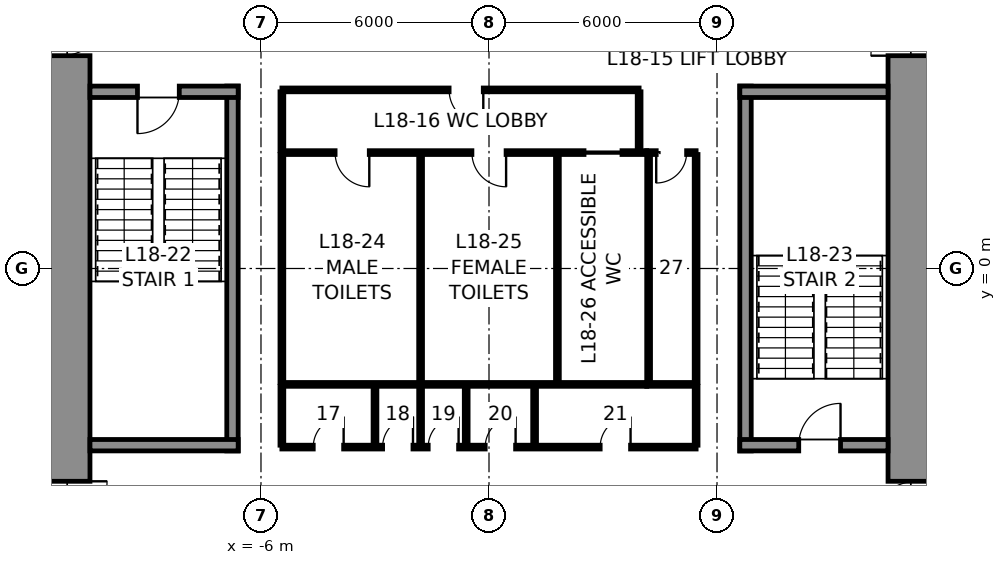
"""IFC4 building model, lengths in metres.
Left out: names, types, materials, properties, quantities, classifications, styles, units other than length and angle.
Written with IfcOpenShell. Run it as: python <this file> out.ifc"""

import sys

from ifc_helpers import new_model, si_unit, direction, frame, frame_2d, origin, place, context, subcontext, project, spatial, rectangle, extrude, element, fill, save


model = new_model("IFC4")
c1 = context("Model", 3, precision=1e-05, world=origin(), true_north=direction((0.0, 1.0)))
c2 = subcontext(c1, "Body", "Model", "MODEL_VIEW")
j1 = project(units=[si_unit("LENGTHUNIT", "METRE"), si_unit("PLANEANGLEUNIT", "RADIAN")], contexts=[c1])
p1 = place(None, origin())
s1 = spatial("IfcSite", under=j1, at=p1, CompositionType="ELEMENT")
p2 = place(p1, origin())
s2 = spatial("IfcBuilding", under=s1, at=p2, CompositionType="ELEMENT")
p3 = place(p2, frame((0.0, 0.0, 95.2)))
s3 = spatial("IfcBuildingStorey", under=s2, at=p3, CompositionType="ELEMENT", Elevation=95.2)
p4 = place(p3, frame((11.25, 10.5, 0.0), z_axis=(0.0, 0.0, 1.0), x_axis=(0.0, -1.0, 0.0)))
e1 = element("IfcWall", 1, at=p4, inside=s3, PredefinedType="SHEAR", context=c2, shape_type="SweptSolid", body=[
    extrude(rectangle(XDim=21.0, YDim=1.5, at=frame_2d((10.5, 0.0))), origin(), (0.0, 0.0, 1.0), 4.6),
])
p5 = place(p4, frame((3.7, 0.0, 0.0)))
e2 = element("IfcOpeningElement", 2, at=p5, cuts=e1, PredefinedType="OPENING", context=c2, shape_type="SweptSolid", body=[
    extrude(rectangle(XDim=1.2, YDim=2.3, at=frame_2d((0.6, 1.15))), frame((0.0, 0.76, 0.0), z_axis=(0.0, -1.0, 0.0), x_axis=(1.0, 0.0, 0.0)), (0.0, 0.0, 1.0), 1.52),
])
p6 = place(p4, frame((16.1, 0.0, 0.0)))
e3 = element("IfcOpeningElement", 3, at=p6, cuts=e1, PredefinedType="OPENING", context=c2, shape_type="SweptSolid", body=[
    extrude(rectangle(XDim=1.2, YDim=2.3, at=frame_2d((0.6, 1.15))), frame((0.0, 0.76, 0.0), z_axis=(0.0, -1.0, 0.0), x_axis=(1.0, 0.0, 0.0)), (0.0, 0.0, 1.0), 1.52),
])
p7 = place(p3, frame((-11.25, -10.5, 0.0), z_axis=(0.0, 0.0, 1.0), x_axis=(0.0, 1.0, 0.0)))
e4 = element("IfcWall", 4, at=p7, inside=s3, PredefinedType="SHEAR", context=c2, shape_type="SweptSolid", body=[
    extrude(rectangle(XDim=21.0, YDim=1.5, at=frame_2d((10.5, 0.0))), origin(), (0.0, 0.0, 1.0), 4.6),
])
p8 = place(p7, frame((16.1, 0.0, 0.0)))
e5 = element("IfcOpeningElement", 5, at=p8, cuts=e4, PredefinedType="OPENING", context=c2, shape_type="SweptSolid", body=[
    extrude(rectangle(XDim=1.2, YDim=2.3, at=frame_2d((0.6, 1.15))), frame((0.0, 0.76, 0.0), z_axis=(0.0, -1.0, 0.0), x_axis=(1.0, 0.0, 0.0)), (0.0, 0.0, 1.0), 1.52),
])
p9 = place(p7, frame((3.7, 0.0, 0.0)))
e6 = element("IfcOpeningElement", 6, at=p9, cuts=e4, PredefinedType="OPENING", context=c2, shape_type="SweptSolid", body=[
    extrude(rectangle(XDim=1.2, YDim=2.3, at=frame_2d((0.6, 1.15))), frame((0.0, 0.76, 0.0), z_axis=(0.0, -1.0, 0.0), x_axis=(1.0, 0.0, 0.0)), (0.0, 0.0, 1.0), 1.52),
])
p10 = place(p3, frame((-6.75, -4.8, 0.0), z_axis=(0.0, 0.0, 1.0), x_axis=(0.0, 1.0, 0.0)))
e7 = element("IfcWall", 7, at=p10, inside=s3, PredefinedType="SOLIDWALL", context=c2, shape_type="SweptSolid", body=[
    extrude(rectangle(XDim=9.6, YDim=0.3, at=frame_2d((4.8, 0.0))), origin(), (0.0, 0.0, 1.0), 4.35),
])
p11 = place(p3, frame((-10.5, 4.65, 0.0), z_axis=(0.0, 0.0, 1.0), x_axis=(1.0, 0.0, 0.0)))
e8 = element("IfcWall", 8, at=p11, inside=s3, PredefinedType="SOLIDWALL", context=c2, shape_type="SweptSolid", body=[
    extrude(rectangle(XDim=3.9, YDim=0.3, at=frame_2d((1.95, 0.0))), origin(), (0.0, 0.0, 1.0), 4.35),
])
p12 = place(p11, frame((1.25, 0.0, 0.0)))
e9 = element("IfcOpeningElement", 9, at=p12, cuts=e8, PredefinedType="OPENING", context=c2, shape_type="SweptSolid", body=[
    extrude(rectangle(XDim=1.1, YDim=2.3, at=frame_2d((0.55, 1.15))), frame((0.0, 0.16, 0.0), z_axis=(0.0, -1.0, 0.0), x_axis=(1.0, 0.0, 0.0)), (0.0, 0.0, 1.0), 0.32),
])
p13 = place(p3, frame((-6.6, -4.65, 0.0), z_axis=(0.0, 0.0, 1.0), x_axis=(-1.0, 0.0, 0.0)))
e10 = element("IfcWall", 10, at=p13, inside=s3, PredefinedType="SOLIDWALL", context=c2, shape_type="SweptSolid", body=[
    extrude(rectangle(XDim=3.9, YDim=0.3, at=frame_2d((1.95, 0.0))), origin(), (0.0, 0.0, 1.0), 4.35),
])
p14 = place(p3, frame((6.75, -4.8, 0.0), z_axis=(0.0, 0.0, 1.0), x_axis=(0.0, 1.0, 0.0)))
e11 = element("IfcWall", 11, at=p14, inside=s3, PredefinedType="SOLIDWALL", context=c2, shape_type="SweptSolid", body=[
    extrude(rectangle(XDim=9.6, YDim=0.3, at=frame_2d((4.8, 0.0))), origin(), (0.0, 0.0, 1.0), 4.35),
])
p15 = place(p3, frame((6.6, 4.65, 0.0), z_axis=(0.0, 0.0, 1.0), x_axis=(1.0, 0.0, 0.0)))
e12 = element("IfcWall", 12, at=p15, inside=s3, PredefinedType="SOLIDWALL", context=c2, shape_type="SweptSolid", body=[
    extrude(rectangle(XDim=3.9, YDim=0.3, at=frame_2d((1.95, 0.0))), origin(), (0.0, 0.0, 1.0), 4.35),
])
p16 = place(p3, frame((10.5, -4.65, 0.0), z_axis=(0.0, 0.0, 1.0), x_axis=(-1.0, 0.0, 0.0)))
e13 = element("IfcWall", 13, at=p16, inside=s3, PredefinedType="SOLIDWALL", context=c2, shape_type="SweptSolid", body=[
    extrude(rectangle(XDim=3.9, YDim=0.3, at=frame_2d((1.95, 0.0))), origin(), (0.0, 0.0, 1.0), 4.35),
])
p17 = place(p16, frame((1.25, 0.0, 0.0)))
e14 = element("IfcOpeningElement", 14, at=p17, cuts=e13, PredefinedType="OPENING", context=c2, shape_type="SweptSolid", body=[
    extrude(rectangle(XDim=1.1, YDim=2.3, at=frame_2d((0.55, 1.15))), frame((0.0, 0.16, 0.0), z_axis=(0.0, -1.0, 0.0), x_axis=(1.0, 0.0, 0.0)), (0.0, 0.0, 1.0), 0.32),
])
p18 = place(p3, frame((-5.45, 3.05, 0.0), z_axis=(0.0, 0.0, 1.0), x_axis=(1.0, 0.0, 0.0)))
e15 = element("IfcWall", 15, at=p18, inside=s3, PredefinedType="PARTITIONING", context=c2, shape_type="SweptSolid", body=[
    extrude(rectangle(XDim=9.6, YDim=0.1, at=frame_2d((4.8, 0.0))), origin(), (0.0, 0.0, 1.0), 4.35),
])
p19 = place(p18, frame((1.4, 0.0, 0.0)))
e16 = element("IfcOpeningElement", 16, at=p19, cuts=e15, PredefinedType="OPENING", context=c2, shape_type="SweptSolid", body=[
    extrude(rectangle(XDim=0.9, YDim=2.3, at=frame_2d((0.45, 1.15))), frame((0.0, 0.06, 0.0), z_axis=(0.0, -1.0, 0.0), x_axis=(1.0, 0.0, 0.0)), (0.0, 0.0, 1.0), 0.12),
])
p20 = place(p18, frame((5.0, 0.0, 0.0)))
e17 = element("IfcOpeningElement", 17, at=p20, cuts=e15, PredefinedType="OPENING", context=c2, shape_type="SweptSolid", body=[
    extrude(rectangle(XDim=0.9, YDim=2.3, at=frame_2d((0.45, 1.15))), frame((0.0, 0.06, 0.0), z_axis=(0.0, -1.0, 0.0), x_axis=(1.0, 0.0, 0.0)), (0.0, 0.0, 1.0), 0.12),
])
p21 = place(p18, frame((7.95, 0.0, 0.0)))
e18 = element("IfcOpeningElement", 18, at=p21, cuts=e15, PredefinedType="OPENING", context=c2, shape_type="SweptSolid", body=[
    extrude(rectangle(XDim=1.0, YDim=2.3, at=frame_2d((0.5, 1.15))), frame((0.0, 0.06, 0.0), z_axis=(0.0, -1.0, 0.0), x_axis=(1.0, 0.0, 0.0)), (0.0, 0.0, 1.0), 0.12),
])
p22 = place(p3, frame((4.15, 3.05, 0.0), z_axis=(0.0, 0.0, 1.0), x_axis=(1.0, 0.0, 0.0)))
e19 = element("IfcWall", 19, at=p22, inside=s3, PredefinedType="PARTITIONING", context=c2, shape_type="SweptSolid", body=[
    extrude(rectangle(XDim=1.3, YDim=0.1, at=frame_2d((0.65, 0.0))), origin(), (0.0, 0.0, 1.0), 4.35),
])
p23 = place(p22, frame((0.25, 0.0, 0.0)))
e20 = element("IfcOpeningElement", 20, at=p23, cuts=e19, PredefinedType="OPENING", context=c2, shape_type="SweptSolid", body=[
    extrude(rectangle(XDim=0.8, YDim=2.3, at=frame_2d((0.4, 1.15))), frame((0.0, 0.06, 0.0), z_axis=(0.0, -1.0, 0.0), x_axis=(1.0, 0.0, 0.0)), (0.0, 0.0, 1.0), 0.12),
])
p24 = place(p3, frame((4.15, -3.05, 0.0), z_axis=(0.0, 0.0, 1.0), x_axis=(-1.0, 0.0, 0.0)))
e21 = element("IfcWall", 21, at=p24, inside=s3, PredefinedType="PARTITIONING", context=c2, shape_type="SweptSolid", body=[
    extrude(rectangle(XDim=9.6, YDim=0.1, at=frame_2d((4.8, 0.0))), origin(), (0.0, 0.0, 1.0), 4.35),
])
p25 = place(p3, frame((5.45, -3.05, 0.0), z_axis=(0.0, 0.0, 1.0), x_axis=(-1.0, 0.0, 0.0)))
e22 = element("IfcWall", 22, at=p25, inside=s3, PredefinedType="PARTITIONING", context=c2, shape_type="SweptSolid", body=[
    extrude(rectangle(XDim=1.3, YDim=0.1, at=frame_2d((0.65, 0.0))), origin(), (0.0, 0.0, 1.0), 4.35),
])
for number, where, z_axis, x_axis in (
    (23, (5.45, 3.0, 0.0), (0.0, 0.0, 1.0), (0.0, -1.0, 0.0)),
    (24, (-5.45, -3.0, 0.0), (0.0, 0.0, 1.0), (0.0, 1.0, 0.0)),
    (25, (-1.8, -3.0, 0.0), (0.0, 0.0, 1.0), (0.0, 1.0, 0.0)),
    (26, (1.8, -3.0, 0.0), (0.0, 0.0, 1.0), (0.0, 1.0, 0.0)),
    (27, (4.2, -3.0, 0.0), (0.0, 0.0, 1.0), (0.0, 1.0, 0.0)),
):
    element("IfcWall", number, at=place(p3, frame(where, z_axis=z_axis, x_axis=x_axis)), inside=s3, PredefinedType="PARTITIONING", context=c2, shape_type="SweptSolid", body=[
        extrude(rectangle(XDim=6.0, YDim=0.1, at=frame_2d((3.0, 0.0))), origin(), (0.0, 0.0, 1.0), 4.35),
    ])
p26 = place(p3, frame((-5.45, 4.7, 0.0), z_axis=(0.0, 0.0, 1.0), x_axis=(1.0, 0.0, 0.0)))
e28 = element("IfcWall", 28, at=p26, inside=s3, PredefinedType="PARTITIONING", context=c2, shape_type="SweptSolid", body=[
    extrude(rectangle(XDim=9.4, YDim=0.1, at=frame_2d((4.7, 0.0))), origin(), (0.0, 0.0, 1.0), 4.35),
])
p27 = place(p26, frame((4.4, 0.0, 0.0)))
e29 = element("IfcOpeningElement", 29, at=p27, cuts=e28, PredefinedType="OPENING", context=c2, shape_type="SweptSolid", body=[
    extrude(rectangle(XDim=0.9, YDim=2.3, at=frame_2d((0.45, 1.15))), frame((0.0, 0.06, 0.0), z_axis=(0.0, -1.0, 0.0), x_axis=(1.0, 0.0, 0.0)), (0.0, 0.0, 1.0), 0.12),
])
for number, where, z_axis, x_axis in (
    (30, (-5.45, 3.1, 0.0), (0.0, 0.0, 1.0), (0.0, 1.0, 0.0)),
    (31, (3.95, 3.1, 0.0), (0.0, 0.0, 1.0), (0.0, 1.0, 0.0)),
):
    element("IfcWall", number, at=place(p3, frame(where, z_axis=z_axis, x_axis=x_axis)), inside=s3, PredefinedType="PARTITIONING", context=c2, shape_type="SweptSolid", body=[
        extrude(rectangle(XDim=1.55, YDim=0.1, at=frame_2d((0.775, 0.0))), origin(), (0.0, 0.0, 1.0), 4.35),
    ])
p28 = place(p3, frame((5.45, -4.7, 0.0), z_axis=(0.0, 0.0, 1.0), x_axis=(-1.0, 0.0, 0.0)))
e32 = element("IfcWall", 32, at=p28, inside=s3, PredefinedType="PARTITIONING", context=c2, shape_type="SweptSolid", body=[
    extrude(rectangle(XDim=10.9, YDim=0.1, at=frame_2d((5.45, 0.0))), origin(), (0.0, 0.0, 1.0), 4.35),
])
p29 = place(p28, frame((9.275, 0.0, 0.0)))
e33 = element("IfcOpeningElement", 33, at=p29, cuts=e32, PredefinedType="OPENING", context=c2, shape_type="SweptSolid", body=[
    extrude(rectangle(XDim=0.8, YDim=2.3, at=frame_2d((0.4, 1.15))), frame((0.0, 0.06, 0.0), z_axis=(0.0, -1.0, 0.0), x_axis=(1.0, 0.0, 0.0)), (0.0, 0.0, 1.0), 0.12),
])
p30 = place(p28, frame((7.45, 0.0, 0.0)))
e34 = element("IfcOpeningElement", 34, at=p30, cuts=e32, PredefinedType="OPENING", context=c2, shape_type="SweptSolid", body=[
    extrude(rectangle(XDim=0.8, YDim=2.3, at=frame_2d((0.4, 1.15))), frame((0.0, 0.06, 0.0), z_axis=(0.0, -1.0, 0.0), x_axis=(1.0, 0.0, 0.0)), (0.0, 0.0, 1.0), 0.12),
])
p31 = place(p28, frame((6.25, 0.0, 0.0)))
e35 = element("IfcOpeningElement", 35, at=p31, cuts=e32, PredefinedType="OPENING", context=c2, shape_type="SweptSolid", body=[
    extrude(rectangle(XDim=0.8, YDim=2.3, at=frame_2d((0.4, 1.15))), frame((0.0, 0.06, 0.0), z_axis=(0.0, -1.0, 0.0), x_axis=(1.0, 0.0, 0.0)), (0.0, 0.0, 1.0), 0.12),
])
p32 = place(p28, frame((4.75, 0.0, 0.0)))
e36 = element("IfcOpeningElement", 36, at=p32, cuts=e32, PredefinedType="OPENING", context=c2, shape_type="SweptSolid", body=[
    extrude(rectangle(XDim=0.8, YDim=2.3, at=frame_2d((0.4, 1.15))), frame((0.0, 0.06, 0.0), z_axis=(0.0, -1.0, 0.0), x_axis=(1.0, 0.0, 0.0)), (0.0, 0.0, 1.0), 0.12),
])
p33 = place(p28, frame((1.725, 0.0, 0.0)))
e37 = element("IfcOpeningElement", 37, at=p33, cuts=e32, PredefinedType="OPENING", context=c2, shape_type="SweptSolid", body=[
    extrude(rectangle(XDim=0.8, YDim=2.3, at=frame_2d((0.4, 1.15))), frame((0.0, 0.06, 0.0), z_axis=(0.0, -1.0, 0.0), x_axis=(1.0, 0.0, 0.0)), (0.0, 0.0, 1.0), 0.12),
])
for number, where, z_axis, x_axis in (
    (38, (-5.45, -3.1, 0.0), (0.0, 0.0, 1.0), (0.0, -1.0, 0.0)),
    (39, (5.45, -3.1, 0.0), (0.0, 0.0, 1.0), (0.0, -1.0, 0.0)),
    (40, (-3.0, -3.1, 0.0), (0.0, 0.0, 1.0), (0.0, -1.0, 0.0)),
    (41, (-1.8, -3.1, 0.0), (0.0, 0.0, 1.0), (0.0, -1.0, 0.0)),
    (42, (-0.6, -3.1, 0.0), (0.0, 0.0, 1.0), (0.0, -1.0, 0.0)),
    (43, (1.2, -3.1, 0.0), (0.0, 0.0, 1.0), (0.0, -1.0, 0.0)),
):
    element("IfcWall", number, at=place(p3, frame(where, z_axis=z_axis, x_axis=x_axis)), inside=s3, PredefinedType="PARTITIONING", context=c2, shape_type="SweptSolid", body=[
        extrude(rectangle(XDim=1.55, YDim=0.1, at=frame_2d((0.775, 0.0))), origin(), (0.0, 0.0, 1.0), 4.35),
    ])
p34 = place(p12, frame((1.1, 0.0, 0.0), z_axis=(0.0, 0.0, 1.0), x_axis=(-1.0, 0.0, 0.0)))
e44 = element("IfcDoor", 44, at=p34, inside=s3, OperationType="SINGLE_SWING_RIGHT", PredefinedType="DOOR", context=c2, shape_type="SweptSolid", body=[
    extrude(rectangle(XDim=1.1, YDim=2.3, at=frame_2d((0.55, 1.15))), frame((0.0, 0.025, 0.0), z_axis=(0.0, -1.0, 0.0), x_axis=(1.0, 0.0, 0.0)), (0.0, 0.0, 1.0), 0.05),
])
fill(e9, e44)
p35 = place(p17, frame((1.1, 0.0, 0.0), z_axis=(0.0, 0.0, 1.0), x_axis=(-1.0, 0.0, 0.0)))
e45 = element("IfcDoor", 45, at=p35, inside=s3, OperationType="SINGLE_SWING_RIGHT", PredefinedType="DOOR", context=c2, shape_type="SweptSolid", body=[
    extrude(rectangle(XDim=1.1, YDim=2.3, at=frame_2d((0.55, 1.15))), frame((0.0, 0.025, 0.0), z_axis=(0.0, -1.0, 0.0), x_axis=(1.0, 0.0, 0.0)), (0.0, 0.0, 1.0), 0.05),
])
fill(e14, e45)
p36 = place(p19, frame((0.9, 0.0, 0.0), z_axis=(0.0, 0.0, 1.0), x_axis=(-1.0, 0.0, 0.0)))
e46 = element("IfcDoor", 46, at=p36, inside=s3, OperationType="SINGLE_SWING_LEFT", PredefinedType="DOOR", context=c2, shape_type="SweptSolid", body=[
    extrude(rectangle(XDim=0.9, YDim=2.3, at=frame_2d((0.45, 1.15))), frame((0.0, 0.025, 0.0), z_axis=(0.0, -1.0, 0.0), x_axis=(1.0, 0.0, 0.0)), (0.0, 0.0, 1.0), 0.05),
])
fill(e16, e46)
p37 = place(p20, frame((0.9, 0.0, 0.0), z_axis=(0.0, 0.0, 1.0), x_axis=(-1.0, 0.0, 0.0)))
e47 = element("IfcDoor", 47, at=p37, inside=s3, OperationType="SINGLE_SWING_LEFT", PredefinedType="DOOR", context=c2, shape_type="SweptSolid", body=[
    extrude(rectangle(XDim=0.9, YDim=2.3, at=frame_2d((0.45, 1.15))), frame((0.0, 0.025, 0.0), z_axis=(0.0, -1.0, 0.0), x_axis=(1.0, 0.0, 0.0)), (0.0, 0.0, 1.0), 0.05),
])
fill(e17, e47)
p38 = place(p21, frame((1.0, 0.0, 0.0), z_axis=(0.0, 0.0, 1.0), x_axis=(-1.0, 0.0, 0.0)))
e48 = element("IfcDoor", 48, at=p38, inside=s3, OperationType="SLIDING_TO_LEFT", PredefinedType="DOOR", context=c2, shape_type="SweptSolid", body=[
    extrude(rectangle(XDim=1.0, YDim=2.3, at=frame_2d((0.5, 1.15))), frame((0.0, 0.025, 0.0), z_axis=(0.0, -1.0, 0.0), x_axis=(1.0, 0.0, 0.0)), (0.0, 0.0, 1.0), 0.05),
])
fill(e18, e48)
p39 = place(p23, frame((0.8, 0.0, 0.0), z_axis=(0.0, 0.0, 1.0), x_axis=(-1.0, 0.0, 0.0)))
e49 = element("IfcDoor", 49, at=p39, inside=s3, OperationType="SINGLE_SWING_RIGHT", PredefinedType="DOOR", context=c2, shape_type="SweptSolid", body=[
    extrude(rectangle(XDim=0.8, YDim=2.3, at=frame_2d((0.4, 1.15))), frame((0.0, 0.025, 0.0), z_axis=(0.0, -1.0, 0.0), x_axis=(1.0, 0.0, 0.0)), (0.0, 0.0, 1.0), 0.05),
])
fill(e20, e49)
p40 = place(p27, frame((0.9, 0.0, 0.0), z_axis=(0.0, 0.0, 1.0), x_axis=(-1.0, 0.0, 0.0)))
e50 = element("IfcDoor", 50, at=p40, inside=s3, OperationType="SINGLE_SWING_LEFT", PredefinedType="DOOR", context=c2, shape_type="SweptSolid", body=[
    extrude(rectangle(XDim=0.9, YDim=2.3, at=frame_2d((0.45, 1.15))), frame((0.0, 0.025, 0.0), z_axis=(0.0, -1.0, 0.0), x_axis=(1.0, 0.0, 0.0)), (0.0, 0.0, 1.0), 0.05),
])
fill(e29, e50)
p41 = place(p29, frame((0.8, 0.0, 0.0), z_axis=(0.0, 0.0, 1.0), x_axis=(-1.0, 0.0, 0.0)))
e51 = element("IfcDoor", 51, at=p41, inside=s3, OperationType="SINGLE_SWING_RIGHT", PredefinedType="DOOR", context=c2, shape_type="SweptSolid", body=[
    extrude(rectangle(XDim=0.8, YDim=2.3, at=frame_2d((0.4, 1.15))), frame((0.0, 0.025, 0.0), z_axis=(0.0, -1.0, 0.0), x_axis=(1.0, 0.0, 0.0)), (0.0, 0.0, 1.0), 0.05),
])
fill(e33, e51)
p42 = place(p30, frame((0.8, 0.0, 0.0), z_axis=(0.0, 0.0, 1.0), x_axis=(-1.0, 0.0, 0.0)))
e52 = element("IfcDoor", 52, at=p42, inside=s3, OperationType="SINGLE_SWING_RIGHT", PredefinedType="DOOR", context=c2, shape_type="SweptSolid", body=[
    extrude(rectangle(XDim=0.8, YDim=2.3, at=frame_2d((0.4, 1.15))), frame((0.0, 0.025, 0.0), z_axis=(0.0, -1.0, 0.0), x_axis=(1.0, 0.0, 0.0)), (0.0, 0.0, 1.0), 0.05),
])
fill(e34, e52)
p43 = place(p31, frame((0.8, 0.0, 0.0), z_axis=(0.0, 0.0, 1.0), x_axis=(-1.0, 0.0, 0.0)))
e53 = element("IfcDoor", 53, at=p43, inside=s3, OperationType="SINGLE_SWING_RIGHT", PredefinedType="DOOR", context=c2, shape_type="SweptSolid", body=[
    extrude(rectangle(XDim=0.8, YDim=2.3, at=frame_2d((0.4, 1.15))), frame((0.0, 0.025, 0.0), z_axis=(0.0, -1.0, 0.0), x_axis=(1.0, 0.0, 0.0)), (0.0, 0.0, 1.0), 0.05),
])
fill(e35, e53)
p44 = place(p32, frame((0.8, 0.0, 0.0), z_axis=(0.0, 0.0, 1.0), x_axis=(-1.0, 0.0, 0.0)))
e54 = element("IfcDoor", 54, at=p44, inside=s3, OperationType="SINGLE_SWING_RIGHT", PredefinedType="DOOR", context=c2, shape_type="SweptSolid", body=[
    extrude(rectangle(XDim=0.8, YDim=2.3, at=frame_2d((0.4, 1.15))), frame((0.0, 0.025, 0.0), z_axis=(0.0, -1.0, 0.0), x_axis=(1.0, 0.0, 0.0)), (0.0, 0.0, 1.0), 0.05),
])
fill(e36, e54)
p45 = place(p33, frame((0.8, 0.0, 0.0), z_axis=(0.0, 0.0, 1.0), x_axis=(-1.0, 0.0, 0.0)))
e55 = element("IfcDoor", 55, at=p45, inside=s3, OperationType="SINGLE_SWING_RIGHT", PredefinedType="DOOR", context=c2, shape_type="SweptSolid", body=[
    extrude(rectangle(XDim=0.8, YDim=2.3, at=frame_2d((0.4, 1.15))), frame((0.0, 0.025, 0.0), z_axis=(0.0, -1.0, 0.0), x_axis=(1.0, 0.0, 0.0)), (0.0, 0.0, 1.0), 0.05),
])
fill(e37, e55)
p46 = place(p8, frame((1.2, 0.0, 0.0), z_axis=(0.0, 0.0, 1.0), x_axis=(-1.0, 0.0, 0.0)))
e56 = element("IfcDoor", 56, at=p46, inside=s3, OperationType="SINGLE_SWING_LEFT", PredefinedType="DOOR", context=c2, shape_type="SweptSolid", body=[
    extrude(rectangle(XDim=1.2, YDim=2.3, at=frame_2d((0.6, 1.15))), frame((0.0, 0.025, 0.0), z_axis=(0.0, -1.0, 0.0), x_axis=(1.0, 0.0, 0.0)), (0.0, 0.0, 1.0), 0.05),
])
fill(e5, e56)
p47 = place(p9, frame((1.2, 0.0, 0.0), z_axis=(0.0, 0.0, 1.0), x_axis=(-1.0, 0.0, 0.0)))
e57 = element("IfcDoor", 57, at=p47, inside=s3, OperationType="SINGLE_SWING_LEFT", PredefinedType="DOOR", context=c2, shape_type="SweptSolid", body=[
    extrude(rectangle(XDim=1.2, YDim=2.3, at=frame_2d((0.6, 1.15))), frame((0.0, 0.025, 0.0), z_axis=(0.0, -1.0, 0.0), x_axis=(1.0, 0.0, 0.0)), (0.0, 0.0, 1.0), 0.05),
])
fill(e6, e57)
p48 = place(p5, frame((1.2, 0.0, 0.0), z_axis=(0.0, 0.0, 1.0), x_axis=(-1.0, 0.0, 0.0)))
e58 = element("IfcDoor", 58, at=p48, inside=s3, OperationType="SINGLE_SWING_LEFT", PredefinedType="DOOR", context=c2, shape_type="SweptSolid", body=[
    extrude(rectangle(XDim=1.2, YDim=2.3, at=frame_2d((0.6, 1.15))), frame((0.0, 0.025, 0.0), z_axis=(0.0, -1.0, 0.0), x_axis=(1.0, 0.0, 0.0)), (0.0, 0.0, 1.0), 0.05),
])
fill(e2, e58)
p49 = place(p6, frame((1.2, 0.0, 0.0), z_axis=(0.0, 0.0, 1.0), x_axis=(-1.0, 0.0, 0.0)))
e59 = element("IfcDoor", 59, at=p49, inside=s3, OperationType="SINGLE_SWING_LEFT", PredefinedType="DOOR", context=c2, shape_type="SweptSolid", body=[
    extrude(rectangle(XDim=1.2, YDim=2.3, at=frame_2d((0.6, 1.15))), frame((0.0, 0.025, 0.0), z_axis=(0.0, -1.0, 0.0), x_axis=(1.0, 0.0, 0.0)), (0.0, 0.0, 1.0), 0.05),
])
fill(e3, e59)
save(model, sys.argv[1])
